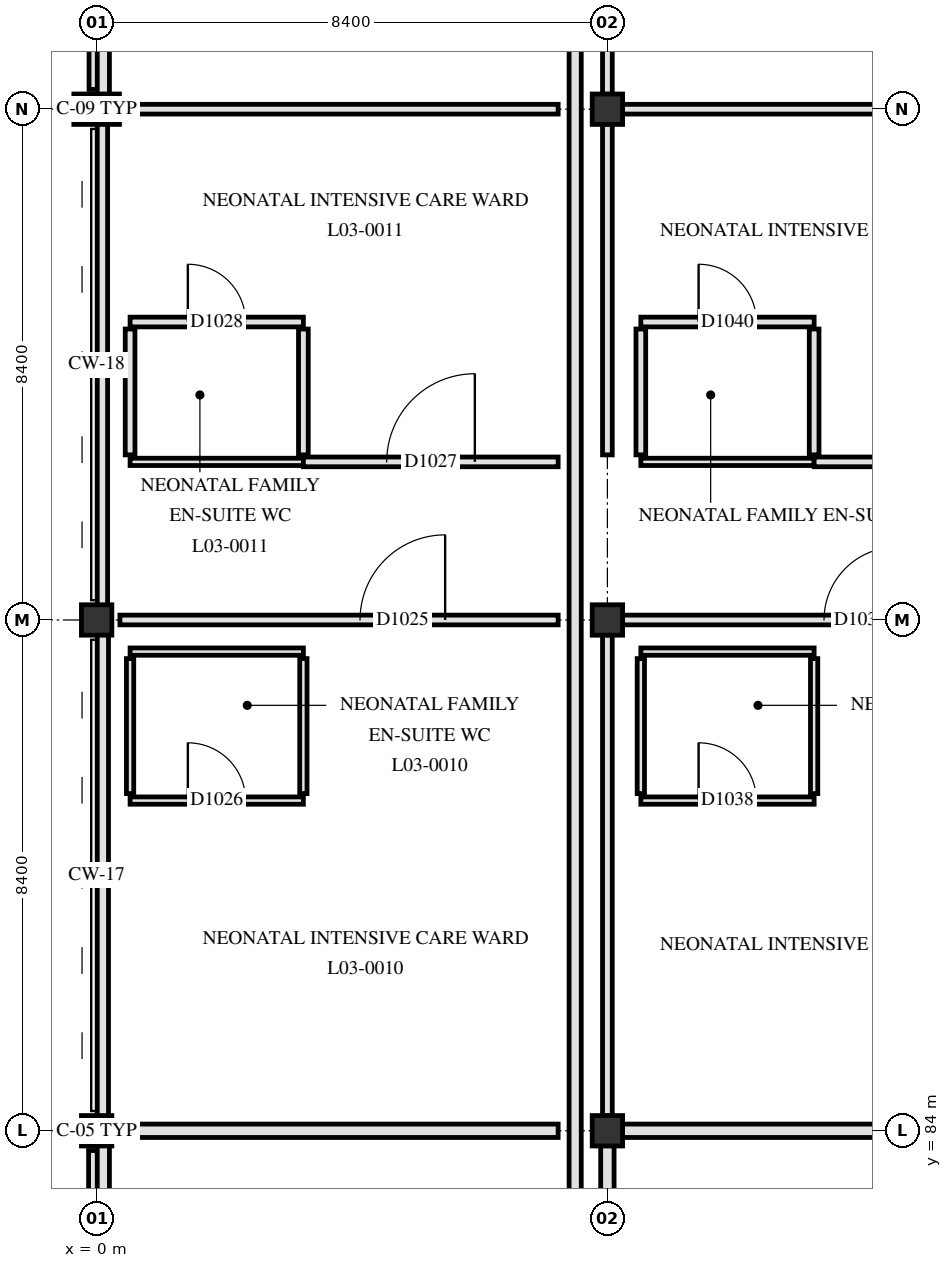
"""IFC4 building model, lengths in metres.
Left out: names, types, materials, properties, quantities, classifications, styles, units other than length and angle.
Written with IfcOpenShell. Run it as: python <this file> out.ifc"""

import sys

from ifc_helpers import new_model, si_unit, direction, frame, frame_2d, origin, origin_2d, place, context, subcontext, project, spatial, rectangle, extrude, element, fill, save


model = new_model("IFC4")
c1 = context("Model", 3, precision=1e-05, world=origin(), true_north=direction((0.0, 1.0)))
c2 = subcontext(c1, "Body", "Model", "MODEL_VIEW")
j1 = project(units=[si_unit("LENGTHUNIT", "METRE"), si_unit("PLANEANGLEUNIT", "RADIAN")], contexts=[c1])
p1 = place(None, origin())
s1 = spatial("IfcSite", under=j1, at=p1, CompositionType="ELEMENT")
p2 = place(p1, origin())
s2 = spatial("IfcBuilding", under=s1, at=p2, CompositionType="ELEMENT")
p3 = place(p2, frame((0.0, 0.0, 14.4)))
s3 = spatial("IfcBuildingStorey", under=s2, at=p3, CompositionType="ELEMENT", Elevation=14.4)
for number, where, z_axis, x_axis in (
    (1, (0.0, 84.0, 0.0), (0.0, 0.0, 1.0), (1.0, 0.0, 0.0)),
    (2, (0.0, 92.4, 0.0), (0.0, 0.0, 1.0), (1.0, 0.0, 0.0)),
):
    element("IfcColumn", number, at=place(p3, frame(where, z_axis=z_axis, x_axis=x_axis)), inside=s3, PredefinedType="COLUMN", context=c2, shape_type="SweptSolid", body=[
        extrude(rectangle(XDim=0.5, YDim=0.5, at=origin_2d()), origin(), (0.0, 0.0, 1.0), 4.2),
    ])
p4 = place(p3, frame((0.0, 100.8, 0.0), z_axis=(0.0, 0.0, 1.0), x_axis=(0.0, 1.0, 0.0)))
e3 = element("IfcColumn", 3, at=p4, inside=s3, PredefinedType="PILASTER", context=c2, shape_type="SweptSolid", body=[
    extrude(rectangle(XDim=0.5, YDim=0.75, at=origin_2d()), origin(), (0.0, 0.0, 1.0), 4.2),
])
for number, where, z_axis, x_axis in (
    (4, (8.4, 84.0, 0.0), (0.0, 0.0, 1.0), (1.0, 0.0, 0.0)),
    (5, (8.4, 92.4, 0.0), (0.0, 0.0, 1.0), (1.0, 0.0, 0.0)),
    (6, (8.4, 100.8, 0.0), (0.0, 0.0, 1.0), (1.0, 0.0, 0.0)),
):
    element("IfcColumn", number, at=place(p3, frame(where, z_axis=z_axis, x_axis=x_axis)), inside=s3, PredefinedType="COLUMN", context=c2, shape_type="SweptSolid", body=[
        extrude(rectangle(XDim=0.5, YDim=0.5, at=origin_2d()), origin(), (0.0, 0.0, 1.0), 4.2),
    ])
p5 = place(p3, frame((0.0, 75.925, 0.0), z_axis=(0.0, 0.0, 1.0), x_axis=(0.0, 1.0, 0.0)))
e7 = element("IfcWall", 7, at=p5, inside=s3, PredefinedType="SOLIDWALL", context=c2, shape_type="SweptSolid", body=[
    extrude(rectangle(XDim=7.75, YDim=0.265, at=frame_2d((3.875, 0.0))), origin(), (0.0, 0.0, 1.0), 3.19),
])
p6 = place(p5, frame((0.938, 0.0, 0.85)))
e8 = element("IfcOpeningElement", 8, at=p6, cuts=e7, PredefinedType="OPENING", context=c2, shape_type="SweptSolid", body=[
    extrude(rectangle(XDim=2.0, YDim=1.66, at=frame_2d((1.0, 0.83))), frame((0.0, 0.142, 0.0), z_axis=(0.0, -1.0, 0.0), x_axis=(1.0, 0.0, 0.0)), (0.0, 0.0, 1.0), 0.285),
])
p7 = place(p5, frame((5.238, 0.0, 0.85)))
e9 = element("IfcOpeningElement", 9, at=p7, cuts=e7, PredefinedType="OPENING", context=c2, shape_type="SweptSolid", body=[
    extrude(rectangle(XDim=1.15, YDim=1.78, at=frame_2d((0.575, 0.89))), frame((0.0, 0.142, 0.0), z_axis=(0.0, -1.0, 0.0), x_axis=(1.0, 0.0, 0.0)), (0.0, 0.0, 1.0), 0.285),
])
p8 = place(p3, frame((0.0, 101.125, 0.0), z_axis=(0.0, 0.0, 1.0), x_axis=(0.0, 1.0, 0.0)))
e10 = element("IfcWall", 10, at=p8, inside=s3, PredefinedType="SOLIDWALL", context=c2, shape_type="SweptSolid", body=[
    extrude(rectangle(XDim=7.75, YDim=0.25, at=frame_2d((3.875, 0.0))), origin(), (0.0, 0.0, 1.0), 3.19),
])
p9 = place(p8, frame((1.288, 0.0, 0.85)))
e11 = element("IfcOpeningElement", 11, at=p9, cuts=e10, PredefinedType="OPENING", context=c2, shape_type="SweptSolid", body=[
    extrude(rectangle(XDim=1.3, YDim=1.78, at=frame_2d((0.65, 0.89))), frame((0.0, 0.135, 0.0), z_axis=(0.0, -1.0, 0.0), x_axis=(1.0, 0.0, 0.0)), (0.0, 0.0, 1.0), 0.27),
])
p10 = place(p8, frame((5.087, 0.0, 0.85)))
e12 = element("IfcOpeningElement", 12, at=p10, cuts=e10, PredefinedType="OPENING", context=c2, shape_type="SweptSolid", body=[
    extrude(rectangle(XDim=1.45, YDim=1.78, at=frame_2d((0.725, 0.89))), frame((0.0, 0.135, 0.0), z_axis=(0.0, -1.0, 0.0), x_axis=(1.0, 0.0, 0.0)), (0.0, 0.0, 1.0), 0.27),
])
p11 = place(p3, frame((7.87, 109.2, 4.18), z_axis=(0.0, 0.0, 1.0), x_axis=(0.0, -1.0, 0.0)))
e13 = element("IfcWall", 13, at=p11, inside=s3, PredefinedType="PARAPET", context=c2, shape_type="SweptSolid", body=[
    extrude(rectangle(XDim=50.4, YDim=0.2, at=frame_2d((25.2, 0.0))), origin(), (0.0, 0.0, 1.0), 1.17),
])
p12 = place(p3, frame((0.11, 75.6, 4.18), z_axis=(0.0, 0.0, 1.0), x_axis=(0.0, 1.0, 0.0)))
e14 = element("IfcWall", 14, at=p12, inside=s3, PredefinedType="PARAPET", context=c2, shape_type="SweptSolid", body=[
    extrude(rectangle(XDim=8.4, YDim=0.2, at=frame_2d((4.2, 0.0))), origin(), (0.0, 0.0, 1.0), 1.17),
])
p13 = place(p3, frame((0.103, 84.0, 4.18), z_axis=(0.0, 0.0, 1.0), x_axis=(0.0, 1.0, 0.0)))
e15 = element("IfcWall", 15, at=p13, inside=s3, PredefinedType="PARAPET", context=c2, shape_type="SweptSolid", body=[
    extrude(rectangle(XDim=8.4, YDim=0.185, at=frame_2d((4.2, 0.0))), origin(), (0.0, 0.0, 1.0), 1.17),
])
p14 = place(p3, frame((0.095, 92.4, 4.18), z_axis=(0.0, 0.0, 1.0), x_axis=(0.0, 1.0, 0.0)))
e16 = element("IfcWall", 16, at=p14, inside=s3, PredefinedType="PARAPET", context=c2, shape_type="SweptSolid", body=[
    extrude(rectangle(XDim=8.4, YDim=0.17, at=frame_2d((4.2, 0.0))), origin(), (0.0, 0.0, 1.0), 1.17),
])
p15 = place(p3, frame((0.11, 100.8, 4.18), z_axis=(0.0, 0.0, 1.0), x_axis=(0.0, 1.0, 0.0)))
e17 = element("IfcWall", 17, at=p15, inside=s3, PredefinedType="PARAPET", context=c2, shape_type="SweptSolid", body=[
    extrude(rectangle(XDim=8.4, YDim=0.2, at=frame_2d((4.2, 0.0))), origin(), (0.0, 0.0, 1.0), 1.17),
])
p16 = place(p3, frame((0.39, 84.0, 0.0), z_axis=(0.0, 0.0, 1.0), x_axis=(1.0, 0.0, 0.0)))
e18 = element("IfcWall", 18, at=p16, inside=s3, PredefinedType="PARTITIONING", context=c2, shape_type="SweptSolid", body=[
    extrude(rectangle(XDim=7.2, YDim=0.22, at=frame_2d((3.6, 0.0))), origin(), (0.0, 0.0, 1.0), 3.29),
])
p17 = place(p3, frame((8.645, 84.0, 0.0), z_axis=(0.0, 0.0, 1.0), x_axis=(1.0, 0.0, 0.0)))
e19 = element("IfcWall", 19, at=p17, inside=s3, PredefinedType="PARTITIONING", context=c2, shape_type="SweptSolid", body=[
    extrude(rectangle(XDim=7.835, YDim=0.22, at=frame_2d((3.917, 0.0))), origin(), (0.0, 0.0, 1.0), 3.28),
])
p18 = place(p3, frame((0.55, 89.43, 0.0), z_axis=(0.0, 0.0, 1.0), x_axis=(1.0, 0.0, 0.0)))
e20 = element("IfcWall", 20, at=p18, inside=s3, PredefinedType="PARTITIONING", context=c2, shape_type="SweptSolid", body=[
    extrude(rectangle(XDim=2.85, YDim=0.12, at=frame_2d((1.425, 0.0))), origin(), (0.0, 0.0, 1.0), 3.89),
])
p19 = place(p18, frame((0.95, 0.0, 0.0)))
e21 = element("IfcOpeningElement", 21, at=p19, cuts=e20, PredefinedType="OPENING", context=c2, shape_type="SweptSolid", body=[
    extrude(rectangle(XDim=0.95, YDim=2.1, at=frame_2d((0.475, 1.05))), frame((0.0, 0.07, 0.0), z_axis=(0.0, -1.0, 0.0), x_axis=(1.0, 0.0, 0.0)), (0.0, 0.0, 1.0), 0.14),
])
p20 = place(p3, frame((8.95, 89.43, 0.0), z_axis=(0.0, 0.0, 1.0), x_axis=(1.0, 0.0, 0.0)))
e22 = element("IfcWall", 22, at=p20, inside=s3, PredefinedType="PARTITIONING", context=c2, shape_type="SweptSolid", body=[
    extrude(rectangle(XDim=2.85, YDim=0.12, at=frame_2d((1.425, 0.0))), origin(), (0.0, 0.0, 1.0), 3.89),
])
p21 = place(p20, frame((0.95, 0.0, 0.0)))
e23 = element("IfcOpeningElement", 23, at=p21, cuts=e22, PredefinedType="OPENING", context=c2, shape_type="SweptSolid", body=[
    extrude(rectangle(XDim=0.95, YDim=2.1, at=frame_2d((0.475, 1.05))), frame((0.0, 0.07, 0.0), z_axis=(0.0, -1.0, 0.0), x_axis=(1.0, 0.0, 0.0)), (0.0, 0.0, 1.0), 0.14),
])
p22 = place(p3, frame((0.55, 91.88, 0.0), z_axis=(0.0, 0.0, 1.0), x_axis=(1.0, 0.0, 0.0)))
e24 = element("IfcWall", 24, at=p22, inside=s3, PredefinedType="PARTITIONING", context=c2, shape_type="SweptSolid", body=[
    extrude(rectangle(XDim=2.85, YDim=0.12, at=frame_2d((1.425, 0.0))), origin(), (0.0, 0.0, 1.0), 3.89),
])
p23 = place(p3, frame((8.95, 91.88, 0.0), z_axis=(0.0, 0.0, 1.0), x_axis=(1.0, 0.0, 0.0)))
e25 = element("IfcWall", 25, at=p23, inside=s3, PredefinedType="PARTITIONING", context=c2, shape_type="SweptSolid", body=[
    extrude(rectangle(XDim=2.85, YDim=0.12, at=frame_2d((1.425, 0.0))), origin(), (0.0, 0.0, 1.0), 3.89),
])
p24 = place(p3, frame((0.383, 92.4, 0.0), z_axis=(0.0, 0.0, 1.0), x_axis=(1.0, 0.0, 0.0)))
e26 = element("IfcWall", 26, at=p24, inside=s3, PredefinedType="PARTITIONING", context=c2, shape_type="SweptSolid", body=[
    extrude(rectangle(XDim=7.208, YDim=0.16, at=frame_2d((3.604, 0.0))), origin(), (0.0, 0.0, 1.0), 3.29),
])
p25 = place(p24, frame((3.949, 0.0, 0.0)))
e27 = element("IfcOpeningElement", 27, at=p25, cuts=e26, PredefinedType="OPENING", context=c2, shape_type="SweptSolid", body=[
    extrude(rectangle(XDim=1.4, YDim=2.2, at=frame_2d((0.7, 1.1))), frame((0.0, 0.09, 0.0), z_axis=(0.0, -1.0, 0.0), x_axis=(1.0, 0.0, 0.0)), (0.0, 0.0, 1.0), 0.18),
])
p26 = place(p3, frame((8.645, 92.4, 0.0), z_axis=(0.0, 0.0, 1.0), x_axis=(1.0, 0.0, 0.0)))
e28 = element("IfcWall", 28, at=p26, inside=s3, PredefinedType="PARTITIONING", context=c2, shape_type="SweptSolid", body=[
    extrude(rectangle(XDim=7.835, YDim=0.16, at=frame_2d((3.917, 0.0))), origin(), (0.0, 0.0, 1.0), 3.28),
])
p27 = place(p26, frame((3.317, 0.0, 0.0)))
e29 = element("IfcOpeningElement", 29, at=p27, cuts=e28, PredefinedType="OPENING", context=c2, shape_type="SweptSolid", body=[
    extrude(rectangle(XDim=1.2, YDim=2.15, at=frame_2d((0.6, 1.075))), frame((0.0, 0.09, 0.0), z_axis=(0.0, -1.0, 0.0), x_axis=(1.0, 0.0, 0.0)), (0.0, 0.0, 1.0), 0.18),
])
p28 = place(p3, frame((0.55, 95.0, 0.0), z_axis=(0.0, 0.0, 1.0), x_axis=(1.0, 0.0, 0.0)))
e30 = element("IfcWall", 30, at=p28, inside=s3, PredefinedType="PARTITIONING", context=c2, shape_type="SweptSolid", body=[
    extrude(rectangle(XDim=2.85, YDim=0.12, at=frame_2d((1.425, 0.0))), origin(), (0.0, 0.0, 1.0), 3.89),
])
p29 = place(p3, frame((3.4, 95.0, 0.0), z_axis=(0.0, 0.0, 1.0), x_axis=(1.0, 0.0, 0.0)))
e31 = element("IfcWall", 31, at=p29, inside=s3, PredefinedType="PARTITIONING", context=c2, shape_type="SweptSolid", body=[
    extrude(rectangle(XDim=4.19, YDim=0.16, at=frame_2d((2.095, 0.0))), origin(), (0.0, 0.0, 1.0), 3.89),
])
p30 = place(p29, frame((1.37, 0.0, 0.0)))
e32 = element("IfcOpeningElement", 32, at=p30, cuts=e31, PredefinedType="OPENING", context=c2, shape_type="SweptSolid", body=[
    extrude(rectangle(XDim=1.45, YDim=2.2, at=frame_2d((0.725, 1.1))), frame((0.0, 0.09, 0.0), z_axis=(0.0, -1.0, 0.0), x_axis=(1.0, 0.0, 0.0)), (0.0, 0.0, 1.0), 0.18),
])
p31 = place(p3, frame((8.95, 95.0, 0.0), z_axis=(0.0, 0.0, 1.0), x_axis=(1.0, 0.0, 0.0)))
e33 = element("IfcWall", 33, at=p31, inside=s3, PredefinedType="PARTITIONING", context=c2, shape_type="SweptSolid", body=[
    extrude(rectangle(XDim=2.85, YDim=0.12, at=frame_2d((1.425, 0.0))), origin(), (0.0, 0.0, 1.0), 3.89),
])
p32 = place(p3, frame((11.8, 95.0, 0.0), z_axis=(0.0, 0.0, 1.0), x_axis=(1.0, 0.0, 0.0)))
e34 = element("IfcWall", 34, at=p32, inside=s3, PredefinedType="PARTITIONING", context=c2, shape_type="SweptSolid", body=[
    extrude(rectangle(XDim=5.0, YDim=0.16, at=frame_2d((2.5, 0.0))), origin(), (0.0, 0.0, 1.0), 3.33),
])
p33 = place(p32, frame((1.85, 0.0, 0.0)))
e35 = element("IfcOpeningElement", 35, at=p33, cuts=e34, PredefinedType="OPENING", context=c2, shape_type="SweptSolid", body=[
    extrude(rectangle(XDim=1.3, YDim=2.2, at=frame_2d((0.65, 1.1))), frame((0.0, 0.09, 0.0), z_axis=(0.0, -1.0, 0.0), x_axis=(1.0, 0.0, 0.0)), (0.0, 0.0, 1.0), 0.18),
])
p34 = place(p3, frame((0.55, 97.3, 0.0), z_axis=(0.0, 0.0, 1.0), x_axis=(1.0, 0.0, 0.0)))
e36 = element("IfcWall", 36, at=p34, inside=s3, PredefinedType="PARTITIONING", context=c2, shape_type="SweptSolid", body=[
    extrude(rectangle(XDim=2.85, YDim=0.16, at=frame_2d((1.425, 0.0))), origin(), (0.0, 0.0, 1.0), 3.89),
])
p35 = place(p34, frame((0.95, 0.0, 0.0)))
e37 = element("IfcOpeningElement", 37, at=p35, cuts=e36, PredefinedType="OPENING", context=c2, shape_type="SweptSolid", body=[
    extrude(rectangle(XDim=0.95, YDim=2.1, at=frame_2d((0.475, 1.05))), frame((0.0, 0.09, 0.0), z_axis=(0.0, -1.0, 0.0), x_axis=(1.0, 0.0, 0.0)), (0.0, 0.0, 1.0), 0.18),
])
p36 = place(p3, frame((8.95, 97.3, 0.0), z_axis=(0.0, 0.0, 1.0), x_axis=(1.0, 0.0, 0.0)))
e38 = element("IfcWall", 38, at=p36, inside=s3, PredefinedType="PARTITIONING", context=c2, shape_type="SweptSolid", body=[
    extrude(rectangle(XDim=2.85, YDim=0.16, at=frame_2d((1.425, 0.0))), origin(), (0.0, 0.0, 1.0), 3.89),
])
p37 = place(p36, frame((0.95, 0.0, 0.0)))
e39 = element("IfcOpeningElement", 39, at=p37, cuts=e38, PredefinedType="OPENING", context=c2, shape_type="SweptSolid", body=[
    extrude(rectangle(XDim=0.95, YDim=2.1, at=frame_2d((0.475, 1.05))), frame((0.0, 0.09, 0.0), z_axis=(0.0, -1.0, 0.0), x_axis=(1.0, 0.0, 0.0)), (0.0, 0.0, 1.0), 0.18),
])
p38 = place(p3, frame((0.39, 100.8, 0.0), z_axis=(0.0, 0.0, 1.0), x_axis=(1.0, 0.0, 0.0)))
e40 = element("IfcWall", 40, at=p38, inside=s3, PredefinedType="PARTITIONING", context=c2, shape_type="SweptSolid", body=[
    extrude(rectangle(XDim=7.2, YDim=0.16, at=frame_2d((3.6, 0.0))), origin(), (0.0, 0.0, 1.0), 3.29),
])
p39 = place(p3, frame((8.645, 100.8, 0.0), z_axis=(0.0, 0.0, 1.0), x_axis=(1.0, 0.0, 0.0)))
e41 = element("IfcWall", 41, at=p39, inside=s3, PredefinedType="PARTITIONING", context=c2, shape_type="SweptSolid", body=[
    extrude(rectangle(XDim=7.91, YDim=0.16, at=frame_2d((3.955, 0.0))), origin(), (0.0, 0.0, 1.0), 3.28),
])
p40 = place(p3, frame((0.55, 89.545, 0.0), z_axis=(0.0, 0.0, 1.0), x_axis=(0.0, 1.0, 0.0)))
e42 = element("IfcWall", 42, at=p40, inside=s3, PredefinedType="PARTITIONING", context=c2, shape_type="SweptSolid", body=[
    extrude(rectangle(XDim=2.22, YDim=0.12, at=frame_2d((1.11, 0.0))), origin(), (0.0, 0.0, 1.0), 3.89),
])
p41 = place(p3, frame((0.55, 95.115, 0.0), z_axis=(0.0, 0.0, 1.0), x_axis=(0.0, 1.0, 0.0)))
e43 = element("IfcWall", 43, at=p41, inside=s3, PredefinedType="PARTITIONING", context=c2, shape_type="SweptSolid", body=[
    extrude(rectangle(XDim=2.07, YDim=0.16, at=frame_2d((1.035, 0.0))), origin(), (0.0, 0.0, 1.0), 3.89),
])
p42 = place(p3, frame((3.4, 89.545, 0.0), z_axis=(0.0, 0.0, 1.0), x_axis=(0.0, 1.0, 0.0)))
e44 = element("IfcWall", 44, at=p42, inside=s3, PredefinedType="PARTITIONING", context=c2, shape_type="SweptSolid", body=[
    extrude(rectangle(XDim=2.22, YDim=0.12, at=frame_2d((1.11, 0.0))), origin(), (0.0, 0.0, 1.0), 3.89),
])
p43 = place(p3, frame((3.4, 95.115, 0.0), z_axis=(0.0, 0.0, 1.0), x_axis=(0.0, 1.0, 0.0)))
e45 = element("IfcWall", 45, at=p43, inside=s3, PredefinedType="PARTITIONING", context=c2, shape_type="SweptSolid", body=[
    extrude(rectangle(XDim=2.07, YDim=0.16, at=frame_2d((1.035, 0.0))), origin(), (0.0, 0.0, 1.0), 3.89),
])
p44 = place(p3, frame((8.4, 78.315, 0.0), z_axis=(0.0, 0.0, 1.0), x_axis=(0.0, 1.0, 0.0)))
e46 = element("IfcWall", 46, at=p44, inside=s3, PredefinedType="PARTITIONING", context=c2, shape_type="SweptSolid", body=[
    extrude(rectangle(XDim=5.44, YDim=0.22, at=frame_2d((2.72, 0.0))), origin(), (0.0, 0.0, 1.0), 3.33),
])
p45 = place(p3, frame((8.4, 84.245, 0.0), z_axis=(0.0, 0.0, 1.0), x_axis=(0.0, 1.0, 0.0)))
e47 = element("IfcWall", 47, at=p45, inside=s3, PredefinedType="PARTITIONING", context=c2, shape_type="SweptSolid", body=[
    extrude(rectangle(XDim=7.91, YDim=0.16, at=frame_2d((3.955, 0.0))), origin(), (0.0, 0.0, 1.0), 3.33),
])
p46 = place(p3, frame((8.4, 95.115, 0.0), z_axis=(0.0, 0.0, 1.0), x_axis=(0.0, 1.0, 0.0)))
e48 = element("IfcWall", 48, at=p46, inside=s3, PredefinedType="PARTITIONING", context=c2, shape_type="SweptSolid", body=[
    extrude(rectangle(XDim=5.44, YDim=0.16, at=frame_2d((2.72, 0.0))), origin(), (0.0, 0.0, 1.0), 3.33),
])
p47 = place(p3, frame((8.4, 101.045, 0.0), z_axis=(0.0, 0.0, 1.0), x_axis=(0.0, 1.0, 0.0)))
e49 = element("IfcWall", 49, at=p47, inside=s3, PredefinedType="PARTITIONING", context=c2, shape_type="SweptSolid", body=[
    extrude(rectangle(XDim=5.44, YDim=0.16, at=frame_2d((2.72, 0.0))), origin(), (0.0, 0.0, 1.0), 3.33),
])
p48 = place(p3, frame((8.95, 89.545, 0.0), z_axis=(0.0, 0.0, 1.0), x_axis=(0.0, 1.0, 0.0)))
e50 = element("IfcWall", 50, at=p48, inside=s3, PredefinedType="PARTITIONING", context=c2, shape_type="SweptSolid", body=[
    extrude(rectangle(XDim=2.22, YDim=0.12, at=frame_2d((1.11, 0.0))), origin(), (0.0, 0.0, 1.0), 3.89),
])
p49 = place(p3, frame((8.95, 95.115, 0.0), z_axis=(0.0, 0.0, 1.0), x_axis=(0.0, 1.0, 0.0)))
e51 = element("IfcWall", 51, at=p49, inside=s3, PredefinedType="PARTITIONING", context=c2, shape_type="SweptSolid", body=[
    extrude(rectangle(XDim=2.07, YDim=0.16, at=frame_2d((1.035, 0.0))), origin(), (0.0, 0.0, 1.0), 3.89),
])
p50 = place(p3, frame((11.8, 89.545, 0.0), z_axis=(0.0, 0.0, 1.0), x_axis=(0.0, 1.0, 0.0)))
e52 = element("IfcWall", 52, at=p50, inside=s3, PredefinedType="PARTITIONING", context=c2, shape_type="SweptSolid", body=[
    extrude(rectangle(XDim=2.22, YDim=0.12, at=frame_2d((1.11, 0.0))), origin(), (0.0, 0.0, 1.0), 3.89),
])
p51 = place(p3, frame((11.8, 95.115, 0.0), z_axis=(0.0, 0.0, 1.0), x_axis=(0.0, 1.0, 0.0)))
e53 = element("IfcWall", 53, at=p51, inside=s3, PredefinedType="PARTITIONING", context=c2, shape_type="SweptSolid", body=[
    extrude(rectangle(XDim=2.07, YDim=0.16, at=frame_2d((1.035, 0.0))), origin(), (0.0, 0.0, 1.0), 3.89),
])
p52 = place(p25, origin())
e54 = element("IfcDoor", 54, at=p52, inside=s3, OperationType="SINGLE_SWING_RIGHT", PredefinedType="DOOR", context=c2, shape_type="SweptSolid", body=[
    extrude(rectangle(XDim=1.4, YDim=2.2, at=frame_2d((0.7, 1.1))), frame((0.0, 0.025, 0.0), z_axis=(0.0, -1.0, 0.0), x_axis=(1.0, 0.0, 0.0)), (0.0, 0.0, 1.0), 0.05),
])
fill(e27, e54)
p53 = place(p19, origin())
e55 = element("IfcDoor", 55, at=p53, inside=s3, OperationType="SINGLE_SWING_LEFT", PredefinedType="DOOR", context=c2, shape_type="SweptSolid", body=[
    extrude(rectangle(XDim=0.95, YDim=2.1, at=frame_2d((0.475, 1.05))), frame((0.0, 0.025, 0.0), z_axis=(0.0, -1.0, 0.0), x_axis=(1.0, 0.0, 0.0)), (0.0, 0.0, 1.0), 0.05),
])
fill(e21, e55)
p54 = place(p30, origin())
e56 = element("IfcDoor", 56, at=p54, inside=s3, OperationType="SINGLE_SWING_RIGHT", PredefinedType="DOOR", context=c2, shape_type="SweptSolid", body=[
    extrude(rectangle(XDim=1.45, YDim=2.2, at=frame_2d((0.725, 1.1))), frame((0.0, 0.025, 0.0), z_axis=(0.0, -1.0, 0.0), x_axis=(1.0, 0.0, 0.0)), (0.0, 0.0, 1.0), 0.05),
])
fill(e32, e56)
p55 = place(p35, origin())
e57 = element("IfcDoor", 57, at=p55, inside=s3, OperationType="SINGLE_SWING_LEFT", PredefinedType="DOOR", context=c2, shape_type="SweptSolid", body=[
    extrude(rectangle(XDim=0.95, YDim=2.1, at=frame_2d((0.475, 1.05))), frame((0.0, 0.025, 0.0), z_axis=(0.0, -1.0, 0.0), x_axis=(1.0, 0.0, 0.0)), (0.0, 0.0, 1.0), 0.05),
])
fill(e37, e57)
p56 = place(p27, origin())
e58 = element("IfcDoor", 58, at=p56, inside=s3, OperationType="SINGLE_SWING_RIGHT", PredefinedType="DOOR", context=c2, shape_type="SweptSolid", body=[
    extrude(rectangle(XDim=1.2, YDim=2.15, at=frame_2d((0.6, 1.075))), frame((0.0, 0.025, 0.0), z_axis=(0.0, -1.0, 0.0), x_axis=(1.0, 0.0, 0.0)), (0.0, 0.0, 1.0), 0.05),
])
fill(e29, e58)
p57 = place(p21, origin())
e59 = element("IfcDoor", 59, at=p57, inside=s3, OperationType="SINGLE_SWING_LEFT", PredefinedType="DOOR", context=c2, shape_type="SweptSolid", body=[
    extrude(rectangle(XDim=0.95, YDim=2.1, at=frame_2d((0.475, 1.05))), frame((0.0, 0.025, 0.0), z_axis=(0.0, -1.0, 0.0), x_axis=(1.0, 0.0, 0.0)), (0.0, 0.0, 1.0), 0.05),
])
fill(e23, e59)
p58 = place(p37, origin())
e60 = element("IfcDoor", 60, at=p58, inside=s3, OperationType="SINGLE_SWING_LEFT", PredefinedType="DOOR", context=c2, shape_type="SweptSolid", body=[
    extrude(rectangle(XDim=0.95, YDim=2.1, at=frame_2d((0.475, 1.05))), frame((0.0, 0.025, 0.0), z_axis=(0.0, -1.0, 0.0), x_axis=(1.0, 0.0, 0.0)), (0.0, 0.0, 1.0), 0.05),
])
fill(e39, e60)
save(model, sys.argv[1])
